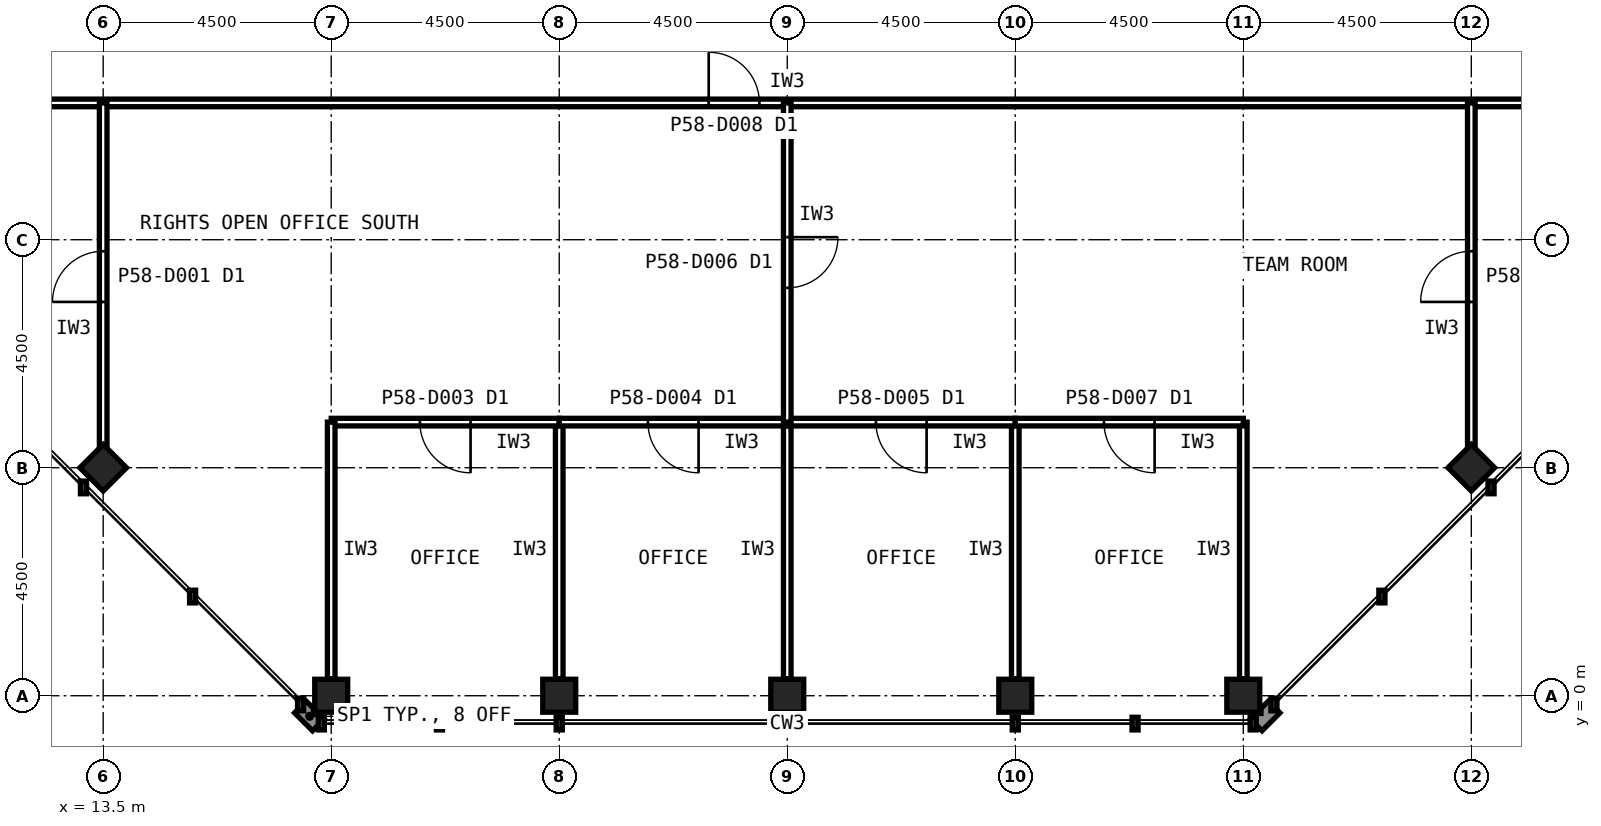
"""IFC4 building model, lengths in metres.
Left out: names, types, materials, properties, quantities, classifications, styles, units other than length and angle.
Written with IfcOpenShell. Run it as: python <this file> out.ifc"""

import sys

from ifc_helpers import new_model, si_unit, direction, frame, frame_2d, origin, origin_2d, place, context, subcontext, project, spatial, rectangle, hollow_rectangle, extrude, element, fill, save


model = new_model("IFC4")
c1 = context("Model", 3, precision=1e-05, world=origin(), true_north=direction((0.0, 1.0)))
c2 = subcontext(c1, "Body", "Model", "MODEL_VIEW")
j1 = project(units=[si_unit("LENGTHUNIT", "METRE"), si_unit("PLANEANGLEUNIT", "RADIAN")], contexts=[c1])
p1 = place(None, origin())
s1 = spatial("IfcSite", under=j1, at=p1, CompositionType="ELEMENT")
p2 = place(p1, origin())
s2 = spatial("IfcBuilding", under=s1, at=p2, CompositionType="ELEMENT")
p3 = place(p2, frame((0.0, 0.0, 246.6)))
s3 = spatial("IfcBuildingStorey", under=s2, at=p3, CompositionType="ELEMENT", Elevation=246.6)
for number, where, z_axis, x_axis in (
    (1, (18.0, 0.0, 0.0), (0.0, 0.0, 1.0), (1.0, 0.0, 0.0)),
    (2, (22.5, 0.0, 0.0), (0.0, 0.0, 1.0), (1.0, 0.0, 0.0)),
    (3, (27.0, 0.0, 0.0), (0.0, 0.0, 1.0), (1.0, 0.0, 0.0)),
    (4, (31.5, 0.0, 0.0), (0.0, 0.0, 1.0), (1.0, 0.0, 0.0)),
    (5, (36.0, 0.0, 0.0), (0.0, 0.0, 1.0), (1.0, 0.0, 0.0)),
    (6, (13.5, 4.5, 0.0), (0.0, 0.0, 1.0), (0.707, 0.707, 0.0)),
    (7, (40.5, 4.5, 0.0), (0.0, 0.0, 1.0), (0.707, 0.707, 0.0)),
):
    element("IfcColumn", number, at=place(p3, frame(where, z_axis=z_axis, x_axis=x_axis)), inside=s3, PredefinedType="COLUMN", context=c2, shape_type="SweptSolid", body=[
        extrude(hollow_rectangle(XDim=0.65, YDim=0.65, WallThickness=0.032, at=origin_2d()), origin(), (0.0, 0.0, 1.0), 4.0),
    ])
p4 = place(p3, frame((11.7, 11.7, 0.0), z_axis=(0.0, 0.0, 1.0), x_axis=(1.0, 0.0, 0.0)))
e8 = element("IfcWall", 8, at=p4, inside=s3, PredefinedType="PARTITIONING", context=c2, shape_type="SweptSolid", body=[
    extrude(rectangle(XDim=30.6, YDim=0.15, at=frame_2d((15.3, 0.0))), origin(), (0.0, 0.0, 1.0), 3.84),
])
p5 = place(p4, frame((13.75, 0.0, 0.0)))
e9 = element("IfcOpeningElement", 9, at=p5, cuts=e8, PredefinedType="OPENING", context=c2, shape_type="SweptSolid", body=[
    extrude(rectangle(XDim=1.0, YDim=2.1, at=frame_2d((0.5, 1.05))), frame((0.0, 0.085, 0.0), z_axis=(0.0, -1.0, 0.0), x_axis=(1.0, 0.0, 0.0)), (0.0, 0.0, 1.0), 0.17),
])
p6 = place(p3, frame((22.5, 0.335, 0.0), z_axis=(0.0, 0.0, 1.0), x_axis=(0.0, 1.0, 0.0)))
e10 = element("IfcWall", 10, at=p6, inside=s3, PredefinedType="PARTITIONING", context=c2, shape_type="SweptSolid", body=[
    extrude(rectangle(XDim=5.065, YDim=0.15, at=frame_2d((2.532, 0.0))), origin(), (0.0, 0.0, 1.0), 2.989),
])
p7 = place(p3, frame((22.5, 5.4, 0.0), z_axis=(0.0, 0.0, 1.0), x_axis=(-1.0, 0.0, 0.0)))
e11 = element("IfcWall", 11, at=p7, inside=s3, PredefinedType="PARTITIONING", context=c2, shape_type="SweptSolid", body=[
    extrude(rectangle(XDim=4.5, YDim=0.15, at=frame_2d((2.25, 0.0))), origin(), (0.0, 0.0, 1.0), 3.84),
])
p8 = place(p7, frame((1.75, 0.0, 0.0)))
e12 = element("IfcOpeningElement", 12, at=p8, cuts=e11, PredefinedType="OPENING", context=c2, shape_type="SweptSolid", body=[
    extrude(rectangle(XDim=1.0, YDim=2.1, at=frame_2d((0.5, 1.05))), frame((0.0, 0.085, 0.0), z_axis=(0.0, -1.0, 0.0), x_axis=(1.0, 0.0, 0.0)), (0.0, 0.0, 1.0), 0.17),
])
for number, where, z_axis, x_axis in (
    (13, (18.0, 5.4, 0.0), (0.0, 0.0, 1.0), (0.0, -1.0, 0.0)),
    (14, (27.0, 0.335, 0.0), (0.0, 0.0, 1.0), (0.0, 1.0, 0.0)),
):
    element("IfcWall", number, at=place(p3, frame(where, z_axis=z_axis, x_axis=x_axis)), inside=s3, PredefinedType="PARTITIONING", context=c2, shape_type="SweptSolid", body=[
        extrude(rectangle(XDim=5.065, YDim=0.15, at=frame_2d((2.532, 0.0))), origin(), (0.0, 0.0, 1.0), 2.989),
    ])
p9 = place(p3, frame((27.0, 5.4, 0.0), z_axis=(0.0, 0.0, 1.0), x_axis=(-1.0, 0.0, 0.0)))
e15 = element("IfcWall", 15, at=p9, inside=s3, PredefinedType="PARTITIONING", context=c2, shape_type="SweptSolid", body=[
    extrude(rectangle(XDim=4.5, YDim=0.15, at=frame_2d((2.25, 0.0))), origin(), (0.0, 0.0, 1.0), 3.84),
])
p10 = place(p9, frame((1.75, 0.0, 0.0)))
e16 = element("IfcOpeningElement", 16, at=p10, cuts=e15, PredefinedType="OPENING", context=c2, shape_type="SweptSolid", body=[
    extrude(rectangle(XDim=1.0, YDim=2.1, at=frame_2d((0.5, 1.05))), frame((0.0, 0.085, 0.0), z_axis=(0.0, -1.0, 0.0), x_axis=(1.0, 0.0, 0.0)), (0.0, 0.0, 1.0), 0.17),
])
p11 = place(p3, frame((31.5, 0.335, 0.0), z_axis=(0.0, 0.0, 1.0), x_axis=(0.0, 1.0, 0.0)))
e17 = element("IfcWall", 17, at=p11, inside=s3, PredefinedType="PARTITIONING", context=c2, shape_type="SweptSolid", body=[
    extrude(rectangle(XDim=5.065, YDim=0.15, at=frame_2d((2.532, 0.0))), origin(), (0.0, 0.0, 1.0), 2.989),
])
p12 = place(p3, frame((31.5, 5.4, 0.0), z_axis=(0.0, 0.0, 1.0), x_axis=(-1.0, 0.0, 0.0)))
e18 = element("IfcWall", 18, at=p12, inside=s3, PredefinedType="PARTITIONING", context=c2, shape_type="SweptSolid", body=[
    extrude(rectangle(XDim=4.5, YDim=0.15, at=frame_2d((2.25, 0.0))), origin(), (0.0, 0.0, 1.0), 3.84),
])
p13 = place(p12, frame((1.75, 0.0, 0.0)))
e19 = element("IfcOpeningElement", 19, at=p13, cuts=e18, PredefinedType="OPENING", context=c2, shape_type="SweptSolid", body=[
    extrude(rectangle(XDim=1.0, YDim=2.1, at=frame_2d((0.5, 1.05))), frame((0.0, 0.085, 0.0), z_axis=(0.0, -1.0, 0.0), x_axis=(1.0, 0.0, 0.0)), (0.0, 0.0, 1.0), 0.17),
])
p14 = place(p3, frame((36.0, 0.335, 0.0), z_axis=(0.0, 0.0, 1.0), x_axis=(0.0, 1.0, 0.0)))
e20 = element("IfcWall", 20, at=p14, inside=s3, PredefinedType="PARTITIONING", context=c2, shape_type="SweptSolid", body=[
    extrude(rectangle(XDim=5.065, YDim=0.15, at=frame_2d((2.532, 0.0))), origin(), (0.0, 0.0, 1.0), 2.989),
])
p15 = place(p3, frame((36.0, 5.4, 0.0), z_axis=(0.0, 0.0, 1.0), x_axis=(-1.0, 0.0, 0.0)))
e21 = element("IfcWall", 21, at=p15, inside=s3, PredefinedType="PARTITIONING", context=c2, shape_type="SweptSolid", body=[
    extrude(rectangle(XDim=4.5, YDim=0.15, at=frame_2d((2.25, 0.0))), origin(), (0.0, 0.0, 1.0), 3.84),
])
p16 = place(p15, frame((1.75, 0.0, 0.0)))
e22 = element("IfcOpeningElement", 22, at=p16, cuts=e21, PredefinedType="OPENING", context=c2, shape_type="SweptSolid", body=[
    extrude(rectangle(XDim=1.0, YDim=2.1, at=frame_2d((0.5, 1.05))), frame((0.0, 0.085, 0.0), z_axis=(0.0, -1.0, 0.0), x_axis=(1.0, 0.0, 0.0)), (0.0, 0.0, 1.0), 0.17),
])
p17 = place(p3, frame((40.5, 4.845, 0.0), z_axis=(0.0, 0.0, 1.0), x_axis=(0.0, 1.0, 0.0)))
e23 = element("IfcWall", 23, at=p17, inside=s3, PredefinedType="PARTITIONING", context=c2, shape_type="SweptSolid", body=[
    extrude(rectangle(XDim=6.855, YDim=0.15, at=frame_2d((3.427, 0.0))), origin(), (0.0, 0.0, 1.0), 2.989),
])
p18 = place(p17, frame((2.927, 0.0, 0.0)))
e24 = element("IfcOpeningElement", 24, at=p18, cuts=e23, PredefinedType="OPENING", context=c2, shape_type="SweptSolid", body=[
    extrude(rectangle(XDim=1.0, YDim=2.1, at=frame_2d((0.5, 1.05))), frame((0.0, 0.085, 0.0), z_axis=(0.0, -1.0, 0.0), x_axis=(1.0, 0.0, 0.0)), (0.0, 0.0, 1.0), 0.17),
])
p19 = place(p3, frame((13.5, 4.845, 0.0), z_axis=(0.0, 0.0, 1.0), x_axis=(0.0, 1.0, 0.0)))
e25 = element("IfcWall", 25, at=p19, inside=s3, PredefinedType="PARTITIONING", context=c2, shape_type="SweptSolid", body=[
    extrude(rectangle(XDim=6.855, YDim=0.15, at=frame_2d((3.427, 0.0))), origin(), (0.0, 0.0, 1.0), 2.989),
])
p20 = place(p19, frame((2.927, 0.0, 0.0)))
e26 = element("IfcOpeningElement", 26, at=p20, cuts=e25, PredefinedType="OPENING", context=c2, shape_type="SweptSolid", body=[
    extrude(rectangle(XDim=1.0, YDim=2.1, at=frame_2d((0.5, 1.05))), frame((0.0, 0.085, 0.0), z_axis=(0.0, -1.0, 0.0), x_axis=(1.0, 0.0, 0.0)), (0.0, 0.0, 1.0), 0.17),
])
p21 = place(p3, frame((27.0, 11.7, 0.0), z_axis=(0.0, 0.0, 1.0), x_axis=(0.0, -1.0, 0.0)))
e27 = element("IfcWall", 27, at=p21, inside=s3, PredefinedType="PARTITIONING", context=c2, shape_type="SweptSolid", body=[
    extrude(rectangle(XDim=6.3, YDim=0.15, at=frame_2d((3.15, 0.0))), origin(), (0.0, 0.0, 1.0), 2.989),
])
p22 = place(p21, frame((2.65, 0.0, 0.0)))
e28 = element("IfcOpeningElement", 28, at=p22, cuts=e27, PredefinedType="OPENING", context=c2, shape_type="SweptSolid", body=[
    extrude(rectangle(XDim=1.0, YDim=2.1, at=frame_2d((0.5, 1.05))), frame((0.0, 0.085, 0.0), z_axis=(0.0, -1.0, 0.0), x_axis=(1.0, 0.0, 0.0)), (0.0, 0.0, 1.0), 0.17),
])
p23 = place(p5, origin())
e29 = element("IfcDoor", 29, at=p23, inside=s3, OperationType="SINGLE_SWING_LEFT", PredefinedType="DOOR", context=c2, shape_type="SweptSolid", body=[
    extrude(rectangle(XDim=1.0, YDim=2.1, at=frame_2d((0.5, 1.05))), frame((0.0, 0.025, 0.0), z_axis=(0.0, -1.0, 0.0), x_axis=(1.0, 0.0, 0.0)), (0.0, 0.0, 1.0), 0.05),
])
fill(e9, e29)
p24 = place(p8, origin())
e30 = element("IfcDoor", 30, at=p24, inside=s3, OperationType="SINGLE_SWING_LEFT", PredefinedType="DOOR", context=c2, shape_type="SweptSolid", body=[
    extrude(rectangle(XDim=1.0, YDim=2.1, at=frame_2d((0.5, 1.05))), frame((0.0, 0.025, 0.0), z_axis=(0.0, -1.0, 0.0), x_axis=(1.0, 0.0, 0.0)), (0.0, 0.0, 1.0), 0.05),
])
fill(e12, e30)
p25 = place(p10, origin())
e31 = element("IfcDoor", 31, at=p25, inside=s3, OperationType="SINGLE_SWING_LEFT", PredefinedType="DOOR", context=c2, shape_type="SweptSolid", body=[
    extrude(rectangle(XDim=1.0, YDim=2.1, at=frame_2d((0.5, 1.05))), frame((0.0, 0.025, 0.0), z_axis=(0.0, -1.0, 0.0), x_axis=(1.0, 0.0, 0.0)), (0.0, 0.0, 1.0), 0.05),
])
fill(e16, e31)
p26 = place(p13, origin())
e32 = element("IfcDoor", 32, at=p26, inside=s3, OperationType="SINGLE_SWING_LEFT", PredefinedType="DOOR", context=c2, shape_type="SweptSolid", body=[
    extrude(rectangle(XDim=1.0, YDim=2.1, at=frame_2d((0.5, 1.05))), frame((0.0, 0.025, 0.0), z_axis=(0.0, -1.0, 0.0), x_axis=(1.0, 0.0, 0.0)), (0.0, 0.0, 1.0), 0.05),
])
fill(e19, e32)
p27 = place(p16, origin())
e33 = element("IfcDoor", 33, at=p27, inside=s3, OperationType="SINGLE_SWING_LEFT", PredefinedType="DOOR", context=c2, shape_type="SweptSolid", body=[
    extrude(rectangle(XDim=1.0, YDim=2.1, at=frame_2d((0.5, 1.05))), frame((0.0, 0.025, 0.0), z_axis=(0.0, -1.0, 0.0), x_axis=(1.0, 0.0, 0.0)), (0.0, 0.0, 1.0), 0.05),
])
fill(e22, e33)
p28 = place(p18, origin())
e34 = element("IfcDoor", 34, at=p28, inside=s3, OperationType="SINGLE_SWING_LEFT", PredefinedType="DOOR", context=c2, shape_type="SweptSolid", body=[
    extrude(rectangle(XDim=1.0, YDim=2.1, at=frame_2d((0.5, 1.05))), frame((0.0, 0.025, 0.0), z_axis=(0.0, -1.0, 0.0), x_axis=(1.0, 0.0, 0.0)), (0.0, 0.0, 1.0), 0.05),
])
fill(e24, e34)
p29 = place(p20, origin())
e35 = element("IfcDoor", 35, at=p29, inside=s3, OperationType="SINGLE_SWING_LEFT", PredefinedType="DOOR", context=c2, shape_type="SweptSolid", body=[
    extrude(rectangle(XDim=1.0, YDim=2.1, at=frame_2d((0.5, 1.05))), frame((0.0, 0.025, 0.0), z_axis=(0.0, -1.0, 0.0), x_axis=(1.0, 0.0, 0.0)), (0.0, 0.0, 1.0), 0.05),
])
fill(e26, e35)
p30 = place(p22, origin())
e36 = element("IfcDoor", 36, at=p30, inside=s3, OperationType="SINGLE_SWING_LEFT", PredefinedType="DOOR", context=c2, shape_type="SweptSolid", body=[
    extrude(rectangle(XDim=1.0, YDim=2.1, at=frame_2d((0.5, 1.05))), frame((0.0, 0.025, 0.0), z_axis=(0.0, -1.0, 0.0), x_axis=(1.0, 0.0, 0.0)), (0.0, 0.0, 1.0), 0.05),
])
fill(e28, e36)
save(model, sys.argv[1])
